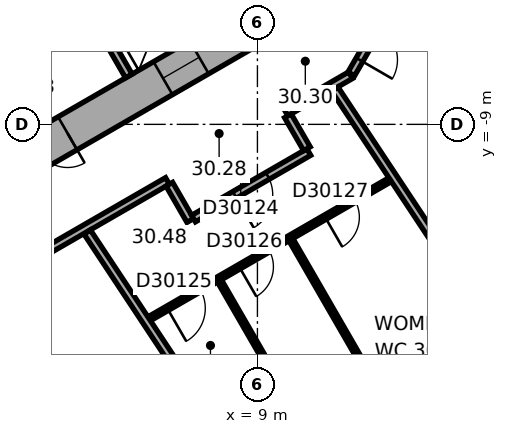
"""IFC4 building model, lengths in metres.
Left out: names, types, materials, properties, quantities, classifications, styles, units other than length and angle.
Written with IfcOpenShell. Run it as: python <this file> out.ifc"""

import sys

from ifc_helpers import new_model, si_unit, direction, frame, frame_2d, origin, place, context, subcontext, project, spatial, rectangle, extrude, element, fill, save


model = new_model("IFC4")
c1 = context("Model", 3, precision=1e-05, world=origin(), true_north=direction((0.0, 1.0)))
c2 = subcontext(c1, "Body", "Model", "MODEL_VIEW")
j1 = project(units=[si_unit("LENGTHUNIT", "METRE"), si_unit("PLANEANGLEUNIT", "RADIAN")], contexts=[c1])
p1 = place(None, origin())
s1 = spatial("IfcSite", under=j1, at=p1, CompositionType="ELEMENT")
p2 = place(p1, origin())
s2 = spatial("IfcBuilding", under=s1, at=p2, CompositionType="ELEMENT")
p3 = place(p2, frame((0.0, 0.0, 124.4)))
s3 = spatial("IfcBuildingStorey", under=s2, at=p3, CompositionType="ELEMENT", Elevation=124.4)
p4 = place(p3, frame((-0.25, -11.691, 0.0), z_axis=(0.0, 0.0, 1.0), x_axis=(0.866022616891, 0.50000482701, 0.0)))
e1 = element("IfcWall", 1, at=p4, inside=s3, PredefinedType="SHEAR", context=c2, shape_type="SweptSolid", body=[
    extrude(rectangle(XDim=12.125, YDim=1.0, at=frame_2d((6.062, 0.0))), origin(), (0.0, 0.0, 1.0), 3.7),
])
p5 = place(p4, frame((4.012, 0.0, 0.0)))
e2 = element("IfcOpeningElement", 2, at=p5, cuts=e1, PredefinedType="OPENING", context=c2, shape_type="SweptSolid", body=[
    extrude(rectangle(XDim=0.9, YDim=2.1, at=frame_2d((0.45, 1.05))), frame((0.0, 0.51, 0.0), z_axis=(0.0, -1.0, 0.0), x_axis=(1.0, 0.0, 0.0)), (0.0, 0.0, 1.0), 1.02),
])
p6 = place(p4, frame((7.812, 0.0, 0.0)))
e3 = element("IfcOpeningElement", 3, at=p6, cuts=e1, PredefinedType="OPENING", context=c2, shape_type="SweptSolid", body=[
    extrude(rectangle(XDim=1.1, YDim=2.1, at=frame_2d((0.55, 1.05))), frame((0.0, 0.51, 0.0), z_axis=(0.0, -1.0, 0.0), x_axis=(1.0, 0.0, 0.0)), (0.0, 0.0, 1.0), 1.02),
])
p7 = place(p3, frame((2.911, -24.156, 0.0), z_axis=(0.0, 0.0, 1.0), x_axis=(0.833882163564, 0.551942512668, 0.0)))
e4 = element("IfcWall", 4, at=p7, inside=s3, PredefinedType="STANDARD", context=c2, shape_type="SweptSolid", body=[
    extrude(rectangle(XDim=20.044, YDim=0.2, at=frame_2d((10.022, 0.0))), origin(), (0.0, 0.0, 1.0), 3.7),
])
p8 = place(p7, frame((1.313, 0.0, 0.9)))
e5 = element("IfcOpeningElement", 5, at=p8, cuts=e4, PredefinedType="OPENING", context=c2, shape_type="SweptSolid", body=[
    extrude(rectangle(XDim=2.4, YDim=2.0, at=frame_2d((1.2, 1.0))), frame((0.0, 0.11, 0.0), z_axis=(0.0, -1.0, 0.0), x_axis=(1.0, 0.0, 0.0)), (0.0, 0.0, 1.0), 0.22),
])
p9 = place(p7, frame((5.067, 0.0, 0.9)))
e6 = element("IfcOpeningElement", 6, at=p9, cuts=e4, PredefinedType="OPENING", context=c2, shape_type="SweptSolid", body=[
    extrude(rectangle(XDim=2.4, YDim=2.0, at=frame_2d((1.2, 1.0))), frame((0.0, 0.11, 0.0), z_axis=(0.0, -1.0, 0.0), x_axis=(1.0, 0.0, 0.0)), (0.0, 0.0, 1.0), 0.22),
])
p10 = place(p7, frame((8.821, 0.0, 0.9)))
e7 = element("IfcOpeningElement", 7, at=p10, cuts=e4, PredefinedType="OPENING", context=c2, shape_type="SweptSolid", body=[
    extrude(rectangle(XDim=2.4, YDim=2.0, at=frame_2d((1.2, 1.0))), frame((0.0, 0.11, 0.0), z_axis=(0.0, -1.0, 0.0), x_axis=(1.0, 0.0, 0.0)), (0.0, 0.0, 1.0), 0.22),
])
p11 = place(p7, frame((12.575, 0.0, 0.9)))
e8 = element("IfcOpeningElement", 8, at=p11, cuts=e4, PredefinedType="OPENING", context=c2, shape_type="SweptSolid", body=[
    extrude(rectangle(XDim=2.4, YDim=2.0, at=frame_2d((1.2, 1.0))), frame((0.0, 0.11, 0.0), z_axis=(0.0, -1.0, 0.0), x_axis=(1.0, 0.0, 0.0)), (0.0, 0.0, 1.0), 0.22),
])
p12 = place(p7, frame((16.329, 0.0, 0.9)))
e9 = element("IfcOpeningElement", 9, at=p12, cuts=e4, PredefinedType="OPENING", context=c2, shape_type="SweptSolid", body=[
    extrude(rectangle(XDim=2.4, YDim=2.0, at=frame_2d((1.2, 1.0))), frame((0.0, 0.11, 0.0), z_axis=(0.0, -1.0, 0.0), x_axis=(1.0, 0.0, 0.0)), (0.0, 0.0, 1.0), 0.22),
])
p13 = place(p3, frame((-0.024, -8.559, 0.0), z_axis=(0.0, 0.0, 1.0), x_axis=(0.866026010844, 0.49999894854, 0.0)))
e10 = element("IfcWall", 10, at=p13, inside=s3, PredefinedType="PARTITIONING", context=c2, shape_type="SweptSolid", body=[
    extrude(rectangle(XDim=8.0, YDim=0.2, at=frame_2d((4.0, 0.0))), origin(), (0.0, 0.0, 1.0), 3.42),
])
p14 = place(p3, frame((4.516, -5.822, 0.0), z_axis=(0.0, 0.0, 1.0), x_axis=(0.499946605688, -0.86605622881, 0.0)))
e11 = element("IfcWall", 11, at=p14, inside=s3, PredefinedType="PARTITIONING", context=c2, shape_type="SweptSolid", body=[
    extrude(rectangle(XDim=2.2, YDim=0.2, at=frame_2d((1.1, 0.0))), origin(), (0.0, 0.0, 1.0), 3.42),
])
p15 = place(p3, frame((0.847, -7.767, 0.0), z_axis=(0.0, 0.0, 1.0), x_axis=(0.866027801685, 0.499995846692, 0.0)))
e12 = element("IfcWall", 12, at=p15, inside=s3, PredefinedType="SHEAR", context=c2, shape_type="SweptSolid", body=[
    extrude(rectangle(XDim=7.06, YDim=0.3, at=frame_2d((3.53, 0.0))), origin(), (0.0, 0.0, 1.0), 3.42),
])
p16 = place(p3, frame((1.204, -13.623, 0.0), z_axis=(0.0, 0.0, 1.0), x_axis=(0.866031867142, 0.49998880497, 0.0)))
e13 = element("IfcWall", 13, at=p16, inside=s3, PredefinedType="PARTITIONING", context=c2, shape_type="SweptSolid", body=[
    extrude(rectangle(XDim=6.268, YDim=0.2, at=frame_2d((3.134, 0.0))), origin(), (0.0, 0.0, 1.0), 3.42),
])
p17 = place(p16, frame((1.381, 0.0, 0.0)))
e14 = element("IfcOpeningElement", 14, at=p17, cuts=e13, PredefinedType="OPENING", context=c2, shape_type="SweptSolid", body=[
    extrude(rectangle(XDim=1.0, YDim=2.1, at=frame_2d((0.5, 1.05))), frame((0.0, 0.11, 0.0), z_axis=(0.0, -1.0, 0.0), x_axis=(1.0, 0.0, 0.0)), (0.0, 0.0, 1.0), 0.22),
])
p18 = place(p3, frame((6.02, -20.899, 0.0), z_axis=(0.0, 0.0, 1.0), x_axis=(-0.551943990108, 0.833881185651, 0.0)))
e15 = element("IfcWall", 15, at=p18, inside=s3, PredefinedType="PARTITIONING", context=c2, shape_type="SweptSolid", body=[
    extrude(rectangle(XDim=8.615, YDim=0.2, at=frame_2d((4.308, 0.0))), origin(), (0.0, 0.0, 1.0), 3.42),
])
p19 = place(p3, frame((6.152, -14.116, 0.0), z_axis=(0.0, 0.0, 1.0), x_axis=(0.866026788224, 0.499997602072, 0.0)))
e16 = element("IfcWall", 16, at=p19, inside=s3, PredefinedType="PARTITIONING", context=c2, shape_type="SweptSolid", body=[
    extrude(rectangle(XDim=7.322, YDim=0.12, at=frame_2d((3.661, 0.0))), origin(), (0.0, 0.0, 1.0), 3.42),
])
p20 = place(p19, frame((0.55, 0.0, 0.0)))
e17 = element("IfcOpeningElement", 17, at=p20, cuts=e16, PredefinedType="OPENING", context=c2, shape_type="SweptSolid", body=[
    extrude(rectangle(XDim=1.0, YDim=2.1, at=frame_2d((0.5, 1.05))), frame((0.0, 0.07, 0.0), z_axis=(0.0, -1.0, 0.0), x_axis=(1.0, 0.0, 0.0)), (0.0, 0.0, 1.0), 0.14),
])
p21 = place(p19, frame((2.736, 0.0, 0.0)))
e18 = element("IfcOpeningElement", 18, at=p21, cuts=e16, PredefinedType="OPENING", context=c2, shape_type="SweptSolid", body=[
    extrude(rectangle(XDim=0.9, YDim=2.1, at=frame_2d((0.45, 1.05))), frame((0.0, 0.07, 0.0), z_axis=(0.0, -1.0, 0.0), x_axis=(1.0, 0.0, 0.0)), (0.0, 0.0, 1.0), 0.14),
])
p22 = place(p19, frame((5.347, 0.0, 0.0)))
e19 = element("IfcOpeningElement", 19, at=p22, cuts=e16, PredefinedType="OPENING", context=c2, shape_type="SweptSolid", body=[
    extrude(rectangle(XDim=0.9, YDim=2.1, at=frame_2d((0.45, 1.05))), frame((0.0, 0.07, 0.0), z_axis=(0.0, -1.0, 0.0), x_axis=(1.0, 0.0, 0.0)), (0.0, 0.0, 1.0), 0.14),
])
p23 = place(p3, frame((6.682, -10.576, 0.0), z_axis=(0.0, 0.0, 1.0), x_axis=(0.499978356969, -0.866037899034, 0.0)))
e20 = element("IfcWall", 20, at=p23, inside=s3, PredefinedType="PARTITIONING", context=c2, shape_type="SweptSolid", body=[
    extrude(rectangle(XDim=1.101, YDim=0.2, at=frame_2d((0.551, 0.0))), origin(), (0.0, 0.0, 1.0), 3.42),
])
p24 = place(p3, frame((7.319, -11.479, 0.0), z_axis=(0.0, 0.0, 1.0), x_axis=(0.866038154057, 0.49997791523, 0.0)))
e21 = element("IfcWall", 21, at=p24, inside=s3, PredefinedType="PARTITIONING", context=c2, shape_type="SweptSolid", body=[
    extrude(rectangle(XDim=3.502, YDim=0.2, at=frame_2d((1.751, 0.0))), origin(), (0.0, 0.0, 1.0), 3.42),
])
p25 = place(p24, frame((1.251, 0.0, 0.0)))
e22 = element("IfcOpeningElement", 22, at=p25, cuts=e21, PredefinedType="OPENING", context=c2, shape_type="SweptSolid", body=[
    extrude(rectangle(XDim=1.0, YDim=2.1, at=frame_2d((0.5, 1.05))), frame((0.0, 0.11, 0.0), z_axis=(0.0, -1.0, 0.0), x_axis=(1.0, 0.0, 0.0)), (0.0, 0.0, 1.0), 0.22),
])
p26 = place(p3, frame((9.15, -18.827, 0.0), z_axis=(0.0, 0.0, 1.0), x_axis=(-0.551942527453, 0.833882153777, 0.0)))
e23 = element("IfcWall", 23, at=p26, inside=s3, PredefinedType="PARTITIONING", context=c2, shape_type="SweptSolid", body=[
    extrude(rectangle(XDim=8.386, YDim=0.2, at=frame_2d((4.193, 0.0))), origin(), (0.0, 0.0, 1.0), 2.87),
])
p27 = place(p3, frame((9.34, -15.439, 0.0), z_axis=(0.0, 0.0, 1.0), x_axis=(-0.500048396672, 0.86599746015, 0.0)))
e24 = element("IfcWall", 24, at=p27, inside=s3, PredefinedType="PARTITIONING", context=c2, shape_type="SweptSolid", body=[
    extrude(rectangle(XDim=2.68, YDim=0.12, at=frame_2d((1.34, 0.0))), origin(), (0.0, 0.0, 1.0), 3.42),
])
p28 = place(p3, frame((9.752, -8.688, 0.0), z_axis=(0.0, 0.0, 1.0), x_axis=(0.865974105138, 0.500088841337, 0.0)))
e25 = element("IfcWall", 25, at=p28, inside=s3, PredefinedType="PARTITIONING", context=c2, shape_type="SweptSolid", body=[
    extrude(rectangle(XDim=1.961, YDim=0.2, at=frame_2d((0.98, 0.0))), origin(), (0.0, 0.0, 1.0), 3.42),
])
p29 = place(p3, frame((10.302, -9.642, 0.0), z_axis=(0.0, 0.0, 1.0), x_axis=(-0.500074377092, 0.865982457891, 0.0)))
e26 = element("IfcWall", 26, at=p29, inside=s3, PredefinedType="PARTITIONING", context=c2, shape_type="SweptSolid", body=[
    extrude(rectangle(XDim=1.001, YDim=0.2, at=frame_2d((0.5, 0.0))), origin(), (0.0, 0.0, 1.0), 3.42),
])
p30 = place(p3, frame((11.47, -7.673, 0.0), z_axis=(0.0, 0.0, 1.0), x_axis=(0.499964847546, 0.866045698112, 0.0)))
e27 = element("IfcWall", 27, at=p30, inside=s3, PredefinedType="PARTITIONING", context=c2, shape_type="SweptSolid", body=[
    extrude(rectangle(XDim=1.86, YDim=0.2, at=frame_2d((0.93, 0.0))), origin(), (0.0, 0.0, 1.0), 3.42),
])
p31 = place(p30, frame((0.43, 0.0, 0.0)))
e28 = element("IfcOpeningElement", 28, at=p31, cuts=e27, PredefinedType="OPENING", context=c2, shape_type="SweptSolid", body=[
    extrude(rectangle(XDim=1.0, YDim=2.1, at=frame_2d((0.5, 1.05))), frame((0.0, 0.11, 0.0), z_axis=(0.0, -1.0, 0.0), x_axis=(1.0, 0.0, 0.0)), (0.0, 0.0, 1.0), 0.22),
])
p32 = place(p3, frame((12.517, -16.599, 0.0), z_axis=(0.0, 0.0, 1.0), x_axis=(-0.500013727357, 0.866017478146, 0.0)))
e29 = element("IfcWall", 29, at=p32, inside=s3, PredefinedType="PARTITIONING", context=c2, shape_type="SweptSolid", body=[
    extrude(rectangle(XDim=5.272, YDim=0.12, at=frame_2d((2.636, 0.0))), origin(), (0.0, 0.0, 1.0), 3.42),
])
p33 = place(p3, frame((15.411, -14.683, 0.0), z_axis=(0.0, 0.0, 1.0), x_axis=(-0.551932106251, 0.833889051427, 0.0)))
e30 = element("IfcWall", 30, at=p33, inside=s3, PredefinedType="PARTITIONING", context=c2, shape_type="SweptSolid", body=[
    extrude(rectangle(XDim=7.926, YDim=0.2, at=frame_2d((3.963, 0.0))), origin(), (0.0, 0.0, 1.0), 2.87),
])
p34 = place(p5, origin())
e31 = element("IfcDoor", 31, at=p34, inside=s3, OperationType="SINGLE_SWING_LEFT", PredefinedType="DOOR", context=c2, shape_type="SweptSolid", body=[
    extrude(rectangle(XDim=0.9, YDim=2.1, at=frame_2d((0.45, 1.05))), frame((0.0, 0.025, 0.0), z_axis=(0.0, -1.0, 0.0), x_axis=(1.0, 0.0, 0.0)), (0.0, 0.0, 1.0), 0.05),
])
fill(e2, e31)
p35 = place(p6, origin())
e32 = element("IfcDoor", 32, at=p35, inside=s3, OperationType="DOUBLE_DOOR_SLIDING", PredefinedType="DOOR", context=c2, shape_type="SweptSolid", body=[
    extrude(rectangle(XDim=1.1, YDim=2.1, at=frame_2d((0.55, 1.05))), frame((0.0, 0.025, 0.0), z_axis=(0.0, -1.0, 0.0), x_axis=(1.0, 0.0, 0.0)), (0.0, 0.0, 1.0), 0.05),
])
fill(e3, e32)
p36 = place(p25, origin())
e33 = element("IfcDoor", 33, at=p36, inside=s3, OperationType="SINGLE_SWING_LEFT", PredefinedType="DOOR", context=c2, shape_type="SweptSolid", body=[
    extrude(rectangle(XDim=1.0, YDim=2.1, at=frame_2d((0.5, 1.05))), frame((0.0, 0.025, 0.0), z_axis=(0.0, -1.0, 0.0), x_axis=(1.0, 0.0, 0.0)), (0.0, 0.0, 1.0), 0.05),
])
fill(e22, e33)
p37 = place(p20, origin())
e34 = element("IfcDoor", 34, at=p37, inside=s3, OperationType="SINGLE_SWING_LEFT", PredefinedType="DOOR", context=c2, shape_type="SweptSolid", body=[
    extrude(rectangle(XDim=1.0, YDim=2.1, at=frame_2d((0.5, 1.05))), frame((0.0, 0.025, 0.0), z_axis=(0.0, -1.0, 0.0), x_axis=(1.0, 0.0, 0.0)), (0.0, 0.0, 1.0), 0.05),
])
fill(e17, e34)
p38 = place(p21, origin())
e35 = element("IfcDoor", 35, at=p38, inside=s3, OperationType="SINGLE_SWING_LEFT", PredefinedType="DOOR", context=c2, shape_type="SweptSolid", body=[
    extrude(rectangle(XDim=0.9, YDim=2.1, at=frame_2d((0.45, 1.05))), frame((0.0, 0.025, 0.0), z_axis=(0.0, -1.0, 0.0), x_axis=(1.0, 0.0, 0.0)), (0.0, 0.0, 1.0), 0.05),
])
fill(e18, e35)
p39 = place(p22, origin())
e36 = element("IfcDoor", 36, at=p39, inside=s3, OperationType="SINGLE_SWING_LEFT", PredefinedType="DOOR", context=c2, shape_type="SweptSolid", body=[
    extrude(rectangle(XDim=0.9, YDim=2.1, at=frame_2d((0.45, 1.05))), frame((0.0, 0.025, 0.0), z_axis=(0.0, -1.0, 0.0), x_axis=(1.0, 0.0, 0.0)), (0.0, 0.0, 1.0), 0.05),
])
fill(e19, e36)
p40 = place(p31, origin())
e37 = element("IfcDoor", 37, at=p40, inside=s3, OperationType="SINGLE_SWING_LEFT", PredefinedType="DOOR", context=c2, shape_type="SweptSolid", body=[
    extrude(rectangle(XDim=1.0, YDim=2.1, at=frame_2d((0.5, 1.05))), frame((0.0, 0.025, 0.0), z_axis=(0.0, -1.0, 0.0), x_axis=(1.0, 0.0, 0.0)), (0.0, 0.0, 1.0), 0.05),
])
fill(e28, e37)
save(model, sys.argv[1])
